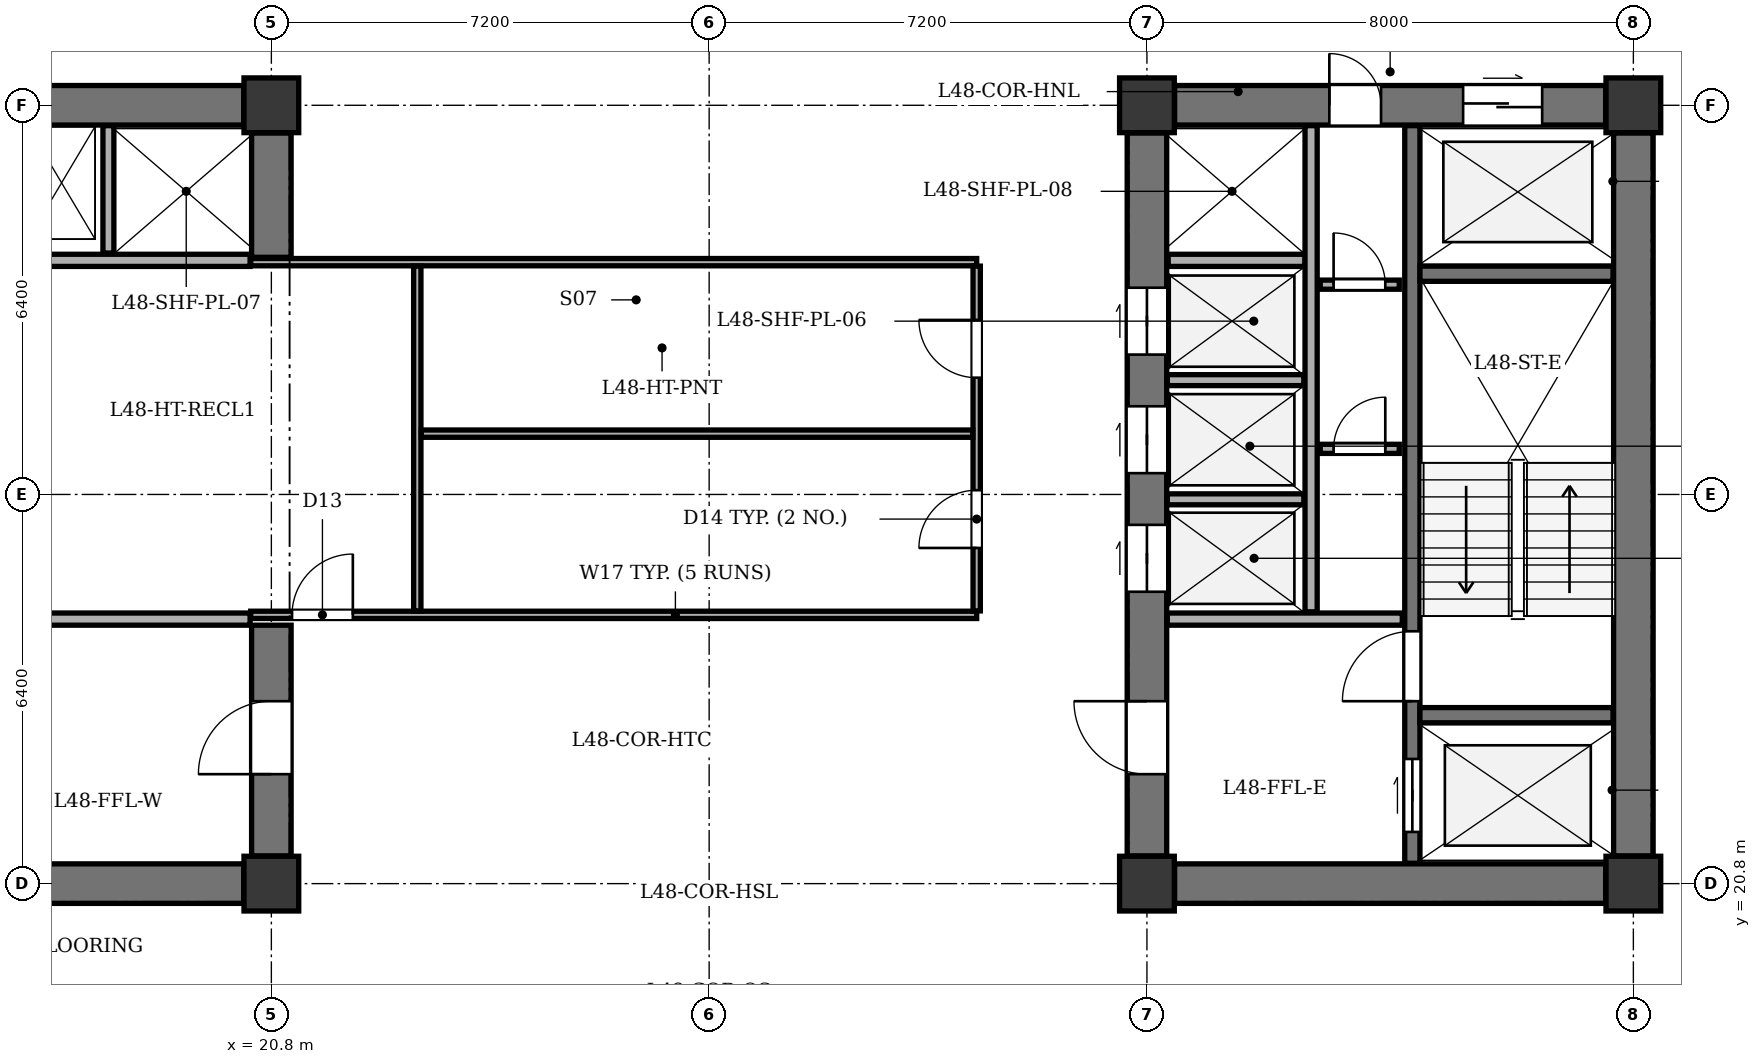
"""IFC4 building model, lengths in metres.
Left out: names, types, materials, properties, quantities, classifications, styles, units other than length and angle.
Written with IfcOpenShell. Run it as: python <this file> out.ifc"""

import sys

from ifc_helpers import new_model, si_unit, direction, frame, frame_2d, origin, origin_2d, place, context, subcontext, project, spatial, rectangle, extrude, element, fill, save


model = new_model("IFC4")
c1 = context("Model", 3, precision=1e-05, world=origin(), true_north=direction((0.0, 1.0)))
c2 = subcontext(c1, "Body", "Model", "MODEL_VIEW")
j1 = project(units=[si_unit("LENGTHUNIT", "METRE"), si_unit("PLANEANGLEUNIT", "RADIAN")], contexts=[c1])
p1 = place(None, origin())
s1 = spatial("IfcSite", under=j1, at=p1, CompositionType="ELEMENT")
p2 = place(p1, origin())
s2 = spatial("IfcBuilding", under=s1, at=p2, CompositionType="ELEMENT")
p3 = place(p2, frame((0.0, 0.0, 186.8)))
s3 = spatial("IfcBuildingStorey", under=s2, at=p3, CompositionType="ELEMENT", Elevation=186.8)
for number, where, z_axis, x_axis in (
    (1, (20.8, 20.8, 0.0), (0.0, 0.0, 1.0), (1.0, 0.0, 0.0)),
    (2, (20.8, 33.6, 0.0), (0.0, 0.0, 1.0), (1.0, 0.0, 0.0)),
    (3, (35.2, 20.8, 0.0), (0.0, 0.0, 1.0), (1.0, 0.0, 0.0)),
    (4, (43.2, 20.8, 0.0), (0.0, 0.0, 1.0), (1.0, 0.0, 0.0)),
    (5, (35.2, 33.6, 0.0), (0.0, 0.0, 1.0), (1.0, 0.0, 0.0)),
    (6, (43.2, 33.6, 0.0), (0.0, 0.0, 1.0), (1.0, 0.0, 0.0)),
):
    element("IfcColumn", number, at=place(p3, frame(where, z_axis=z_axis, x_axis=x_axis)), inside=s3, PredefinedType="COLUMN", context=c2, shape_type="SweptSolid", body=[
        extrude(rectangle(XDim=0.9, YDim=0.9, at=origin_2d()), origin(), (0.0, 0.0, 1.0), 3.5),
    ])
p4 = place(p3, frame((13.255, 20.8, 0.0), z_axis=(0.0, 0.0, 1.0), x_axis=(1.0, 0.0, 0.0)))
e7 = element("IfcWall", 7, at=p4, inside=s3, PredefinedType="SHEAR", context=c2, shape_type="SweptSolid", body=[
    extrude(rectangle(XDim=7.09, YDim=0.65, at=frame_2d((3.545, 0.0))), origin(), (0.0, 0.0, 1.0), 3.2),
])
p5 = place(p3, frame((13.255, 33.6, 0.0), z_axis=(0.0, 0.0, 1.0), x_axis=(1.0, 0.0, 0.0)))
e8 = element("IfcWall", 8, at=p5, inside=s3, PredefinedType="SHEAR", context=c2, shape_type="SweptSolid", body=[
    extrude(rectangle(XDim=7.09, YDim=0.65, at=frame_2d((3.545, 0.0))), origin(), (0.0, 0.0, 1.0), 3.2),
])
p6 = place(p5, frame((0.445, 0.0, 0.0)))
e9 = element("IfcOpeningElement", 9, at=p6, cuts=e8, PredefinedType="OPENING", context=c2, shape_type="SweptSolid", body=[
    extrude(rectangle(XDim=0.85, YDim=2.02, at=frame_2d((0.425, 1.01))), frame((0.0, 0.335, 0.0), z_axis=(0.0, -1.0, 0.0), x_axis=(1.0, 0.0, 0.0)), (0.0, 0.0, 1.0), 0.67),
])
p7 = place(p5, frame((1.745, 0.0, 0.0)))
e10 = element("IfcOpeningElement", 10, at=p7, cuts=e8, PredefinedType="OPENING", context=c2, shape_type="SweptSolid", body=[
    extrude(rectangle(XDim=0.85, YDim=2.02, at=frame_2d((0.425, 1.01))), frame((0.0, 0.335, 0.0), z_axis=(0.0, -1.0, 0.0), x_axis=(1.0, 0.0, 0.0)), (0.0, 0.0, 1.0), 0.67),
])
p8 = place(p3, frame((20.8, 21.255, 0.0), z_axis=(0.0, 0.0, 1.0), x_axis=(0.0, 1.0, 0.0)))
e11 = element("IfcWall", 11, at=p8, inside=s3, PredefinedType="SHEAR", context=c2, shape_type="SweptSolid", body=[
    extrude(rectangle(XDim=3.795, YDim=0.65, at=frame_2d((1.897, 0.0))), origin(), (0.0, 0.0, 1.0), 3.2),
])
p9 = place(p8, frame((1.345, 0.0, 0.0)))
e12 = element("IfcOpeningElement", 12, at=p9, cuts=e11, PredefinedType="OPENING", context=c2, shape_type="SweptSolid", body=[
    extrude(rectangle(XDim=1.2, YDim=2.15, at=frame_2d((0.6, 1.075))), frame((0.0, 0.335, 0.0), z_axis=(0.0, -1.0, 0.0), x_axis=(1.0, 0.0, 0.0)), (0.0, 0.0, 1.0), 0.67),
])
p10 = place(p3, frame((20.8, 31.1, 0.0), z_axis=(0.0, 0.0, 1.0), x_axis=(0.0, 1.0, 0.0)))
e13 = element("IfcWall", 13, at=p10, inside=s3, PredefinedType="SHEAR", context=c2, shape_type="SweptSolid", body=[
    extrude(rectangle(XDim=2.045, YDim=0.65, at=frame_2d((1.022, 0.0))), origin(), (0.0, 0.0, 1.0), 3.2),
])
for number, where, z_axis, x_axis in (
    (14, (16.6, 25.15, 0.0), (0.0, 0.0, 1.0), (1.0, 0.0, 0.0)),
    (15, (16.6, 31.05, 0.0), (0.0, 0.0, 1.0), (1.0, 0.0, 0.0)),
):
    element("IfcWall", number, at=place(p3, frame(where, z_axis=z_axis, x_axis=x_axis)), inside=s3, PredefinedType="SOLIDWALL", context=c2, shape_type="SweptSolid", body=[
        extrude(rectangle(XDim=3.85, YDim=0.2, at=frame_2d((1.925, 0.0))), origin(), (0.0, 0.0, 1.0), 3.2),
    ])
p11 = place(p3, frame((18.12, 31.17, 0.0), z_axis=(0.0, 0.0, 1.0), x_axis=(0.0, 1.0, 0.0)))
e16 = element("IfcWall", 16, at=p11, inside=s3, PredefinedType="PARTITIONING", context=c2, shape_type="SweptSolid", body=[
    extrude(rectangle(XDim=2.095, YDim=0.18, at=frame_2d((1.047, 0.0))), origin(), (0.0, 0.0, 1.0), 3.2),
])
p12 = place(p3, frame((43.2, 21.255, 0.0), z_axis=(0.0, 0.0, 1.0), x_axis=(0.0, 1.0, 0.0)))
e17 = element("IfcWall", 17, at=p12, inside=s3, PredefinedType="SHEAR", context=c2, shape_type="SweptSolid", body=[
    extrude(rectangle(XDim=11.89, YDim=0.65, at=frame_2d((5.945, 0.0))), origin(), (0.0, 0.0, 1.0), 3.2),
])
p13 = place(p3, frame((35.655, 20.8, 0.0), z_axis=(0.0, 0.0, 1.0), x_axis=(1.0, 0.0, 0.0)))
e18 = element("IfcWall", 18, at=p13, inside=s3, PredefinedType="SHEAR", context=c2, shape_type="SweptSolid", body=[
    extrude(rectangle(XDim=7.09, YDim=0.65, at=frame_2d((3.545, 0.0))), origin(), (0.0, 0.0, 1.0), 3.2),
])
p14 = place(p3, frame((35.655, 33.6, 0.0), z_axis=(0.0, 0.0, 1.0), x_axis=(1.0, 0.0, 0.0)))
e19 = element("IfcWall", 19, at=p14, inside=s3, PredefinedType="SHEAR", context=c2, shape_type="SweptSolid", body=[
    extrude(rectangle(XDim=7.09, YDim=0.65, at=frame_2d((3.545, 0.0))), origin(), (0.0, 0.0, 1.0), 3.2),
])
p15 = place(p14, frame((4.745, 0.0, 0.0)))
e20 = element("IfcOpeningElement", 20, at=p15, cuts=e19, PredefinedType="OPENING", context=c2, shape_type="SweptSolid", body=[
    extrude(rectangle(XDim=1.3, YDim=2.15, at=frame_2d((0.65, 1.075))), frame((0.0, 0.335, 0.0), z_axis=(0.0, -1.0, 0.0), x_axis=(1.0, 0.0, 0.0)), (0.0, 0.0, 1.0), 0.67),
])
p16 = place(p14, frame((2.545, 0.0, 0.0)))
e21 = element("IfcOpeningElement", 21, at=p16, cuts=e19, PredefinedType="OPENING", context=c2, shape_type="SweptSolid", body=[
    extrude(rectangle(XDim=0.85, YDim=2.02, at=frame_2d((0.425, 1.01))), frame((0.0, 0.335, 0.0), z_axis=(0.0, -1.0, 0.0), x_axis=(1.0, 0.0, 0.0)), (0.0, 0.0, 1.0), 0.67),
])
p17 = place(p3, frame((35.2, 21.255, 0.0), z_axis=(0.0, 0.0, 1.0), x_axis=(0.0, 1.0, 0.0)))
e22 = element("IfcWall", 22, at=p17, inside=s3, PredefinedType="SHEAR", context=c2, shape_type="SweptSolid", body=[
    extrude(rectangle(XDim=11.89, YDim=0.65, at=frame_2d((5.945, 0.0))), origin(), (0.0, 0.0, 1.0), 3.2),
])
p18 = place(p17, frame((1.345, 0.0, 0.0)))
e23 = element("IfcOpeningElement", 23, at=p18, cuts=e22, PredefinedType="OPENING", context=c2, shape_type="SweptSolid", body=[
    extrude(rectangle(XDim=1.2, YDim=2.15, at=frame_2d((0.6, 1.075))), frame((0.0, 0.335, 0.0), z_axis=(0.0, -1.0, 0.0), x_axis=(1.0, 0.0, 0.0)), (0.0, 0.0, 1.0), 0.67),
])
p19 = place(p17, frame((4.345, 0.0, 0.0)))
e24 = element("IfcOpeningElement", 24, at=p19, cuts=e22, PredefinedType="OPENING", context=c2, shape_type="SweptSolid", body=[
    extrude(rectangle(XDim=1.1, YDim=2.1, at=frame_2d((0.55, 1.05))), frame((0.0, 0.335, 0.0), z_axis=(0.0, -1.0, 0.0), x_axis=(1.0, 0.0, 0.0)), (0.0, 0.0, 1.0), 0.67),
])
p20 = place(p17, frame((6.295, 0.0, 0.0)))
e25 = element("IfcOpeningElement", 25, at=p20, cuts=e22, PredefinedType="OPENING", context=c2, shape_type="SweptSolid", body=[
    extrude(rectangle(XDim=1.1, YDim=2.1, at=frame_2d((0.55, 1.05))), frame((0.0, 0.335, 0.0), z_axis=(0.0, -1.0, 0.0), x_axis=(1.0, 0.0, 0.0)), (0.0, 0.0, 1.0), 0.67),
])
p21 = place(p17, frame((8.245, 0.0, 0.0)))
e26 = element("IfcOpeningElement", 26, at=p21, cuts=e22, PredefinedType="OPENING", context=c2, shape_type="SweptSolid", body=[
    extrude(rectangle(XDim=1.1, YDim=2.1, at=frame_2d((0.55, 1.05))), frame((0.0, 0.335, 0.0), z_axis=(0.0, -1.0, 0.0), x_axis=(1.0, 0.0, 0.0)), (0.0, 0.0, 1.0), 0.67),
])
p22 = place(p3, frame((39.565, 21.135, 0.0), z_axis=(0.0, 0.0, 1.0), x_axis=(0.0, 1.0, 0.0)))
e27 = element("IfcWall", 27, at=p22, inside=s3, PredefinedType="SHEAR", context=c2, shape_type="SweptSolid", body=[
    extrude(rectangle(XDim=12.13, YDim=0.25, at=frame_2d((6.065, 0.0))), origin(), (0.0, 0.0, 1.0), 3.2),
])
p23 = place(p22, frame((0.515, 0.0, 0.0)))
e28 = element("IfcOpeningElement", 28, at=p23, cuts=e27, PredefinedType="OPENING", context=c2, shape_type="SweptSolid", body=[
    extrude(rectangle(XDim=1.2, YDim=2.15, at=frame_2d((0.6, 1.075))), frame((0.0, 0.135, 0.0), z_axis=(0.0, -1.0, 0.0), x_axis=(1.0, 0.0, 0.0)), (0.0, 0.0, 1.0), 0.27),
])
p24 = place(p22, frame((2.665, 0.0, 0.0)))
e29 = element("IfcOpeningElement", 29, at=p24, cuts=e27, PredefinedType="OPENING", context=c2, shape_type="SweptSolid", body=[
    extrude(rectangle(XDim=1.15, YDim=2.15, at=frame_2d((0.575, 1.075))), frame((0.0, 0.135, 0.0), z_axis=(0.0, -1.0, 0.0), x_axis=(1.0, 0.0, 0.0)), (0.0, 0.0, 1.0), 0.27),
])
for number, where, z_axis, x_axis in (
    (30, (39.69, 23.57, 0.0), (0.0, 0.0, 1.0), (1.0, 0.0, 0.0)),
    (31, (39.69, 30.83, 0.0), (0.0, 0.0, 1.0), (1.0, 0.0, 0.0)),
):
    element("IfcWall", number, at=place(p3, frame(where, z_axis=z_axis, x_axis=x_axis)), inside=s3, PredefinedType="SHEAR", context=c2, shape_type="SweptSolid", body=[
        extrude(rectangle(XDim=3.175, YDim=0.25, at=frame_2d((1.587, 0.0))), origin(), (0.0, 0.0, 1.0), 3.2),
    ])
p25 = place(p3, frame((35.535, 25.15, 0.0), z_axis=(0.0, 0.0, 1.0), x_axis=(1.0, 0.0, 0.0)))
e32 = element("IfcWall", 32, at=p25, inside=s3, PredefinedType="SOLIDWALL", context=c2, shape_type="SweptSolid", body=[
    extrude(rectangle(XDim=3.865, YDim=0.2, at=frame_2d((1.933, 0.0))), origin(), (0.0, 0.0, 1.0), 3.2),
])
p26 = place(p3, frame((35.55, 31.05, 0.0), z_axis=(0.0, 0.0, 1.0), x_axis=(1.0, 0.0, 0.0)))
e33 = element("IfcWall", 33, at=p26, inside=s3, PredefinedType="SOLIDWALL", context=c2, shape_type="SweptSolid", body=[
    extrude(rectangle(XDim=2.25, YDim=0.2, at=frame_2d((1.125, 0.0))), origin(), (0.0, 0.0, 1.0), 3.2),
])
p27 = place(p3, frame((37.9, 25.27, 0.0), z_axis=(0.0, 0.0, 1.0), x_axis=(0.0, 1.0, 0.0)))
e34 = element("IfcWall", 34, at=p27, inside=s3, PredefinedType="SOLIDWALL", context=c2, shape_type="SweptSolid", body=[
    extrude(rectangle(XDim=7.995, YDim=0.2, at=frame_2d((3.998, 0.0))), origin(), (0.0, 0.0, 1.0), 3.2),
])
for number, where, z_axis, x_axis in (
    (35, (35.535, 27.12, 0.0), (0.0, 0.0, 1.0), (1.0, 0.0, 0.0)),
    (36, (35.535, 29.08, 0.0), (0.0, 0.0, 1.0), (1.0, 0.0, 0.0)),
):
    element("IfcWall", number, at=place(p3, frame(where, z_axis=z_axis, x_axis=x_axis)), inside=s3, PredefinedType="PARTITIONING", context=c2, shape_type="SweptSolid", body=[
        extrude(rectangle(XDim=2.245, YDim=0.18, at=frame_2d((1.123, 0.0))), origin(), (0.0, 0.0, 1.0), 3.2),
    ])
p28 = place(p3, frame((38.05, 27.95, 0.0), z_axis=(0.0, 0.0, 1.0), x_axis=(1.0, 0.0, 0.0)))
e37 = element("IfcWall", 37, at=p28, inside=s3, PredefinedType="PARTITIONING", context=c2, shape_type="SweptSolid", body=[
    extrude(rectangle(XDim=1.3, YDim=0.15, at=frame_2d((0.65, 0.0))), origin(), (0.0, 0.0, 1.0), 3.2),
])
p29 = place(p28, frame((0.22, 0.0, 0.0)))
e38 = element("IfcOpeningElement", 38, at=p29, cuts=e37, PredefinedType="OPENING", context=c2, shape_type="SweptSolid", body=[
    extrude(rectangle(XDim=0.85, YDim=2.02, at=frame_2d((0.425, 1.01))), frame((0.0, 0.085, 0.0), z_axis=(0.0, -1.0, 0.0), x_axis=(1.0, 0.0, 0.0)), (0.0, 0.0, 1.0), 0.17),
])
p30 = place(p3, frame((38.05, 30.65, 0.0), z_axis=(0.0, 0.0, 1.0), x_axis=(1.0, 0.0, 0.0)))
e39 = element("IfcWall", 39, at=p30, inside=s3, PredefinedType="PARTITIONING", context=c2, shape_type="SweptSolid", body=[
    extrude(rectangle(XDim=1.3, YDim=0.15, at=frame_2d((0.65, 0.0))), origin(), (0.0, 0.0, 1.0), 3.2),
])
p31 = place(p30, frame((0.22, 0.0, 0.0)))
e40 = element("IfcOpeningElement", 40, at=p31, cuts=e39, PredefinedType="OPENING", context=c2, shape_type="SweptSolid", body=[
    extrude(rectangle(XDim=0.85, YDim=2.02, at=frame_2d((0.425, 1.01))), frame((0.0, 0.085, 0.0), z_axis=(0.0, -1.0, 0.0), x_axis=(1.0, 0.0, 0.0)), (0.0, 0.0, 1.0), 0.17),
])
p32 = place(p3, frame((20.46, 25.22, 0.0), z_axis=(0.0, 0.0, 1.0), x_axis=(1.0, 0.0, 0.0)))
e41 = element("IfcWall", 41, at=p32, inside=s3, PredefinedType="PARTITIONING", context=c2, shape_type="SweptSolid", body=[
    extrude(rectangle(XDim=11.94, YDim=0.12, at=frame_2d((5.97, 0.0))), origin(), (0.0, 0.0, 1.0), 3.2),
])
p33 = place(p32, frame((0.68, 0.0, 0.0)))
e42 = element("IfcOpeningElement", 42, at=p33, cuts=e41, PredefinedType="OPENING", context=c2, shape_type="SweptSolid", body=[
    extrude(rectangle(XDim=1.0, YDim=2.1, at=frame_2d((0.5, 1.05))), frame((0.0, 0.07, 0.0), z_axis=(0.0, -1.0, 0.0), x_axis=(1.0, 0.0, 0.0)), (0.0, 0.0, 1.0), 0.14),
])
p34 = place(p3, frame((20.46, 31.02, 0.0), z_axis=(0.0, 0.0, 1.0), x_axis=(1.0, 0.0, 0.0)))
e43 = element("IfcWall", 43, at=p34, inside=s3, PredefinedType="PARTITIONING", context=c2, shape_type="SweptSolid", body=[
    extrude(rectangle(XDim=11.94, YDim=0.12, at=frame_2d((5.97, 0.0))), origin(), (0.0, 0.0, 1.0), 3.2),
])
p35 = place(p3, frame((32.4, 25.285, 0.0), z_axis=(0.0, 0.0, 1.0), x_axis=(0.0, 1.0, 0.0)))
e44 = element("IfcWall", 44, at=p35, inside=s3, PredefinedType="PARTITIONING", context=c2, shape_type="SweptSolid", body=[
    extrude(rectangle(XDim=5.67, YDim=0.12, at=frame_2d((2.835, 0.0))), origin(), (0.0, 0.0, 1.0), 3.2),
])
p36 = place(p35, frame((1.035, 0.0, 0.0)))
e45 = element("IfcOpeningElement", 45, at=p36, cuts=e44, PredefinedType="OPENING", context=c2, shape_type="SweptSolid", body=[
    extrude(rectangle(XDim=0.95, YDim=2.1, at=frame_2d((0.475, 1.05))), frame((0.0, 0.07, 0.0), z_axis=(0.0, -1.0, 0.0), x_axis=(1.0, 0.0, 0.0)), (0.0, 0.0, 1.0), 0.14),
])
p37 = place(p35, frame((3.835, 0.0, 0.0)))
e46 = element("IfcOpeningElement", 46, at=p37, cuts=e44, PredefinedType="OPENING", context=c2, shape_type="SweptSolid", body=[
    extrude(rectangle(XDim=0.95, YDim=2.1, at=frame_2d((0.475, 1.05))), frame((0.0, 0.07, 0.0), z_axis=(0.0, -1.0, 0.0), x_axis=(1.0, 0.0, 0.0)), (0.0, 0.0, 1.0), 0.14),
])
p38 = place(p3, frame((23.2, 25.285, 0.0), z_axis=(0.0, 0.0, 1.0), x_axis=(0.0, 1.0, 0.0)))
e47 = element("IfcWall", 47, at=p38, inside=s3, PredefinedType="PARTITIONING", context=c2, shape_type="SweptSolid", body=[
    extrude(rectangle(XDim=5.67, YDim=0.12, at=frame_2d((2.835, 0.0))), origin(), (0.0, 0.0, 1.0), 3.2),
])
p39 = place(p3, frame((23.265, 28.2, 0.0), z_axis=(0.0, 0.0, 1.0), x_axis=(1.0, 0.0, 0.0)))
e48 = element("IfcWall", 48, at=p39, inside=s3, PredefinedType="PARTITIONING", context=c2, shape_type="SweptSolid", body=[
    extrude(rectangle(XDim=9.07, YDim=0.12, at=frame_2d((4.535, 0.0))), origin(), (0.0, 0.0, 1.0), 3.2),
])
p40 = place(p9, origin())
e49 = element("IfcDoor", 49, at=p40, inside=s3, OperationType="SINGLE_SWING_LEFT", PredefinedType="DOOR", context=c2, shape_type="SweptSolid", body=[
    extrude(rectangle(XDim=1.2, YDim=2.15, at=frame_2d((0.6, 1.075))), frame((0.0, 0.025, 0.0), z_axis=(0.0, -1.0, 0.0), x_axis=(1.0, 0.0, 0.0)), (0.0, 0.0, 1.0), 0.05),
])
fill(e12, e49)
p41 = place(p15, origin())
e50 = element("IfcDoor", 50, at=p41, inside=s3, OperationType="DOUBLE_DOOR_SLIDING", PredefinedType="DOOR", context=c2, shape_type="SweptSolid", body=[
    extrude(rectangle(XDim=1.3, YDim=2.15, at=frame_2d((0.65, 1.075))), frame((0.0, 0.025, 0.0), z_axis=(0.0, -1.0, 0.0), x_axis=(1.0, 0.0, 0.0)), (0.0, 0.0, 1.0), 0.05),
])
fill(e20, e50)
p42 = place(p16, origin())
e51 = element("IfcDoor", 51, at=p42, inside=s3, OperationType="SINGLE_SWING_LEFT", PredefinedType="DOOR", context=c2, shape_type="SweptSolid", body=[
    extrude(rectangle(XDim=0.85, YDim=2.02, at=frame_2d((0.425, 1.01))), frame((0.0, 0.025, 0.0), z_axis=(0.0, -1.0, 0.0), x_axis=(1.0, 0.0, 0.0)), (0.0, 0.0, 1.0), 0.05),
])
fill(e21, e51)
p43 = place(p18, origin())
e52 = element("IfcDoor", 52, at=p43, inside=s3, OperationType="SINGLE_SWING_RIGHT", PredefinedType="DOOR", context=c2, shape_type="SweptSolid", body=[
    extrude(rectangle(XDim=1.2, YDim=2.15, at=frame_2d((0.6, 1.075))), frame((0.0, 0.025, 0.0), z_axis=(0.0, -1.0, 0.0), x_axis=(1.0, 0.0, 0.0)), (0.0, 0.0, 1.0), 0.05),
])
fill(e23, e52)
p44 = place(p19, origin())
e53 = element("IfcDoor", 53, at=p44, inside=s3, OperationType="DOUBLE_DOOR_SLIDING", PredefinedType="DOOR", context=c2, shape_type="SweptSolid", body=[
    extrude(rectangle(XDim=1.1, YDim=2.1, at=frame_2d((0.55, 1.05))), frame((0.0, 0.025, 0.0), z_axis=(0.0, -1.0, 0.0), x_axis=(1.0, 0.0, 0.0)), (0.0, 0.0, 1.0), 0.05),
])
fill(e24, e53)
p45 = place(p20, origin())
e54 = element("IfcDoor", 54, at=p45, inside=s3, OperationType="DOUBLE_DOOR_SLIDING", PredefinedType="DOOR", context=c2, shape_type="SweptSolid", body=[
    extrude(rectangle(XDim=1.1, YDim=2.1, at=frame_2d((0.55, 1.05))), frame((0.0, 0.025, 0.0), z_axis=(0.0, -1.0, 0.0), x_axis=(1.0, 0.0, 0.0)), (0.0, 0.0, 1.0), 0.05),
])
fill(e25, e54)
p46 = place(p21, origin())
e55 = element("IfcDoor", 55, at=p46, inside=s3, OperationType="DOUBLE_DOOR_SLIDING", PredefinedType="DOOR", context=c2, shape_type="SweptSolid", body=[
    extrude(rectangle(XDim=1.1, YDim=2.1, at=frame_2d((0.55, 1.05))), frame((0.0, 0.025, 0.0), z_axis=(0.0, -1.0, 0.0), x_axis=(1.0, 0.0, 0.0)), (0.0, 0.0, 1.0), 0.05),
])
fill(e26, e55)
p47 = place(p23, origin())
e56 = element("IfcDoor", 56, at=p47, inside=s3, OperationType="DOUBLE_DOOR_SLIDING", PredefinedType="DOOR", context=c2, shape_type="SweptSolid", body=[
    extrude(rectangle(XDim=1.2, YDim=2.15, at=frame_2d((0.6, 1.075))), frame((0.0, 0.025, 0.0), z_axis=(0.0, -1.0, 0.0), x_axis=(1.0, 0.0, 0.0)), (0.0, 0.0, 1.0), 0.05),
])
fill(e28, e56)
p48 = place(p24, origin())
e57 = element("IfcDoor", 57, at=p48, inside=s3, OperationType="SINGLE_SWING_LEFT", PredefinedType="DOOR", context=c2, shape_type="SweptSolid", body=[
    extrude(rectangle(XDim=1.15, YDim=2.15, at=frame_2d((0.575, 1.075))), frame((0.0, 0.025, 0.0), z_axis=(0.0, -1.0, 0.0), x_axis=(1.0, 0.0, 0.0)), (0.0, 0.0, 1.0), 0.05),
])
fill(e29, e57)
p49 = place(p29, origin())
e58 = element("IfcDoor", 58, at=p49, inside=s3, OperationType="SINGLE_SWING_RIGHT", PredefinedType="DOOR", context=c2, shape_type="SweptSolid", body=[
    extrude(rectangle(XDim=0.85, YDim=2.02, at=frame_2d((0.425, 1.01))), frame((0.0, 0.025, 0.0), z_axis=(0.0, -1.0, 0.0), x_axis=(1.0, 0.0, 0.0)), (0.0, 0.0, 1.0), 0.05),
])
fill(e38, e58)
p50 = place(p31, origin())
e59 = element("IfcDoor", 59, at=p50, inside=s3, OperationType="SINGLE_SWING_LEFT", PredefinedType="DOOR", context=c2, shape_type="SweptSolid", body=[
    extrude(rectangle(XDim=0.85, YDim=2.02, at=frame_2d((0.425, 1.01))), frame((0.0, 0.025, 0.0), z_axis=(0.0, -1.0, 0.0), x_axis=(1.0, 0.0, 0.0)), (0.0, 0.0, 1.0), 0.05),
])
fill(e40, e59)
p51 = place(p33, origin())
e60 = element("IfcDoor", 60, at=p51, inside=s3, OperationType="SINGLE_SWING_RIGHT", PredefinedType="DOOR", context=c2, shape_type="SweptSolid", body=[
    extrude(rectangle(XDim=1.0, YDim=2.1, at=frame_2d((0.5, 1.05))), frame((0.0, 0.025, 0.0), z_axis=(0.0, -1.0, 0.0), x_axis=(1.0, 0.0, 0.0)), (0.0, 0.0, 1.0), 0.05),
])
fill(e42, e60)
p52 = place(p36, origin())
e61 = element("IfcDoor", 61, at=p52, inside=s3, OperationType="SINGLE_SWING_LEFT", PredefinedType="DOOR", context=c2, shape_type="SweptSolid", body=[
    extrude(rectangle(XDim=0.95, YDim=2.1, at=frame_2d((0.475, 1.05))), frame((0.0, 0.025, 0.0), z_axis=(0.0, -1.0, 0.0), x_axis=(1.0, 0.0, 0.0)), (0.0, 0.0, 1.0), 0.05),
])
fill(e45, e61)
p53 = place(p37, origin())
e62 = element("IfcDoor", 62, at=p53, inside=s3, OperationType="SINGLE_SWING_RIGHT", PredefinedType="DOOR", context=c2, shape_type="SweptSolid", body=[
    extrude(rectangle(XDim=0.95, YDim=2.1, at=frame_2d((0.475, 1.05))), frame((0.0, 0.025, 0.0), z_axis=(0.0, -1.0, 0.0), x_axis=(1.0, 0.0, 0.0)), (0.0, 0.0, 1.0), 0.05),
])
fill(e46, e62)
save(model, sys.argv[1])
